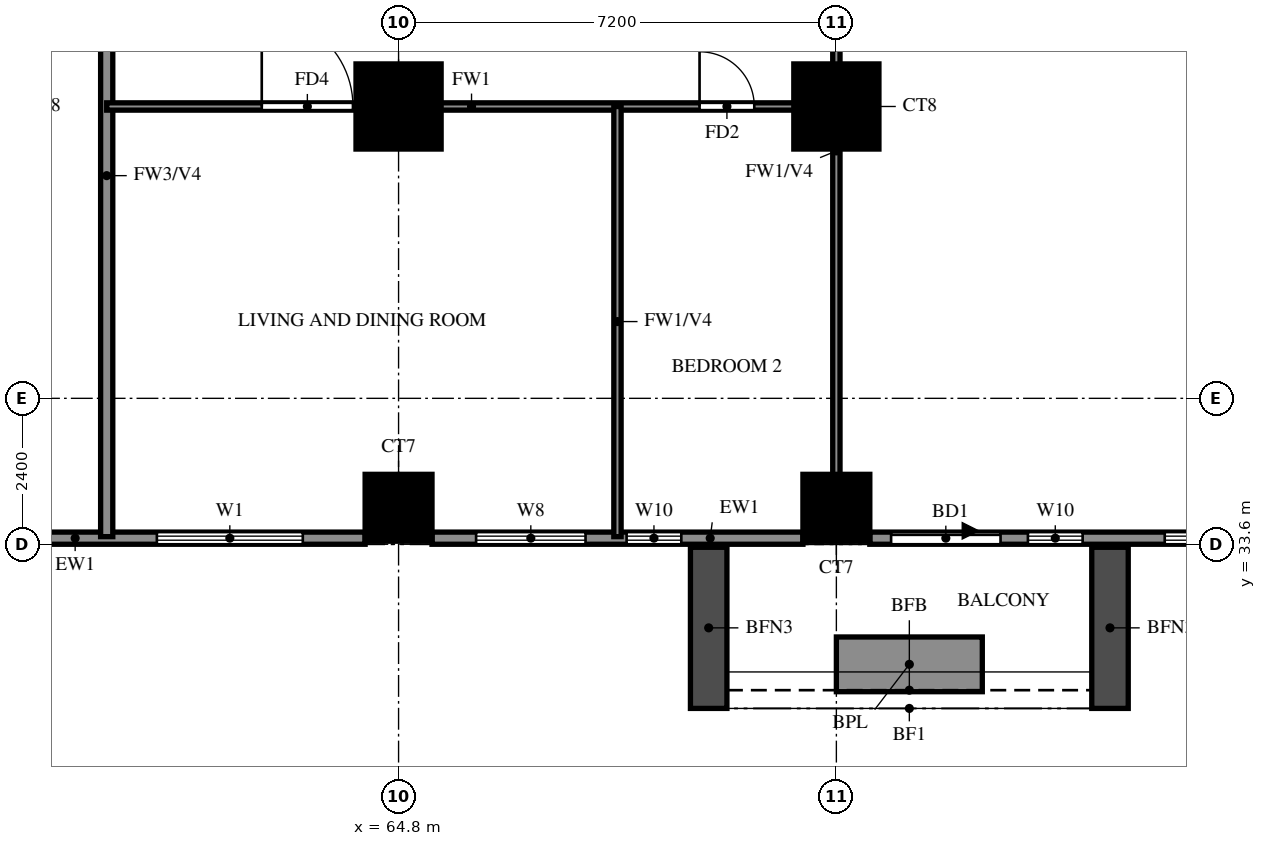
"""IFC4 building model, lengths in metres.
Left out: names, types, materials, properties, quantities, classifications, styles, units other than length and angle.
Written with IfcOpenShell. Run it as: python <this file> out.ifc"""

import sys

from ifc_helpers import new_model, si_unit, direction, frame, frame_2d, origin, origin_2d, place, context, subcontext, project, spatial, rectangle, extrude, source, transform, mapped, element, fill, save


model = new_model("IFC4")
c1 = context("Model", 3, precision=1e-05, world=origin(), true_north=direction((0.0, 1.0)))
c2 = subcontext(c1, "Body", "Model", "MODEL_VIEW")
j1 = project(units=[si_unit("LENGTHUNIT", "METRE"), si_unit("PLANEANGLEUNIT", "RADIAN")], contexts=[c1])
p1 = place(None, origin())
s1 = spatial("IfcSite", under=j1, at=p1, CompositionType="ELEMENT")
p2 = place(p1, origin())
s2 = spatial("IfcBuilding", under=s1, at=p2, CompositionType="ELEMENT")
p3 = place(p2, frame((0.0, 0.0, 30.5)))
s3 = spatial("IfcBuildingStorey", under=s2, at=p3, CompositionType="ELEMENT", Elevation=30.5)
m1 = source(origin(), c2, "Body", "SweptSolid", [
    extrude(rectangle(XDim=1.1, YDim=1.1, at=origin_2d()), origin(), (0.0, 0.0, 1.0), 3.18),
])
for number, where, z_axis, x_axis in (
    (1, (64.8, 34.2, 0.0), (0.0, 0.0, 1.0), (1.0, 0.0, 0.0)),
    (2, (72.0, 34.2, 0.0), (0.0, 0.0, 1.0), (1.0, 0.0, 0.0)),
):
    element("IfcColumn", number, at=place(p3, frame(where, z_axis=z_axis, x_axis=x_axis)), inside=s3, PredefinedType="COLUMN", context=c2, shape_type="MappedRepresentation", body=[
        mapped(m1, transform((0.0, 0.0, 0.0))),
    ])
m2 = source(origin(), c2, "Body", "SweptSolid", [
    extrude(rectangle(XDim=1.4, YDim=1.4, at=origin_2d()), origin(), (0.0, 0.0, 1.0), 3.18),
])
for number, where, z_axis, x_axis in (
    (3, (64.8, 40.8, 0.0), (0.0, 0.0, 1.0), (1.0, 0.0, 0.0)),
    (4, (72.0, 40.8, 0.0), (0.0, 0.0, 1.0), (1.0, 0.0, 0.0)),
):
    element("IfcColumn", number, at=place(p3, frame(where, z_axis=z_axis, x_axis=x_axis)), inside=s3, PredefinedType="COLUMN", context=c2, shape_type="MappedRepresentation", body=[
        mapped(m2, transform((0.0, 0.0, 0.0))),
    ])
p4 = place(p3, frame((78.74, 41.118, 0.0), z_axis=(0.0, 0.0, 1.0), x_axis=(-0.707106781187, 0.707106781187, 0.0)))
e5 = element("IfcWall", 5, at=p4, inside=s3, PredefinedType="SOLIDWALL", context=c2, shape_type="SweptSolid", body=[
    extrude(rectangle(XDim=9.874, YDim=0.2, at=frame_2d((4.937, 0.0))), origin(), (0.0, 0.0, 1.0), 3.18),
])
p5 = place(p3, frame((58.8, 33.7, 0.0), z_axis=(0.0, 0.0, 1.0), x_axis=(1.0, 0.0, 0.0)))
e6 = element("IfcWall", 6, at=p5, inside=s3, PredefinedType="SOLIDWALL", context=c2, shape_type="SweptSolid", body=[
    extrude(rectangle(XDim=5.45, YDim=0.2, at=frame_2d((2.725, 0.0))), origin(), (0.0, 0.0, 1.0), 3.18),
])
p6 = place(p5, frame((2.025, 0.0, 0.6)))
e7 = element("IfcOpeningElement", 7, at=p6, cuts=e6, PredefinedType="OPENING", context=c2, shape_type="SweptSolid", body=[
    extrude(rectangle(XDim=2.4, YDim=2.4, at=frame_2d((1.2, 1.2))), frame((0.0, 0.11, 0.0), z_axis=(0.0, -1.0, 0.0), x_axis=(1.0, 0.0, 0.0)), (0.0, 0.0, 1.0), 0.22),
])
p7 = place(p3, frame((65.35, 33.7, 0.0), z_axis=(0.0, 0.0, 1.0), x_axis=(1.0, 0.0, 0.0)))
e8 = element("IfcWall", 8, at=p7, inside=s3, PredefinedType="SOLIDWALL", context=c2, shape_type="SweptSolid", body=[
    extrude(rectangle(XDim=6.1, YDim=0.2, at=frame_2d((3.05, 0.0))), origin(), (0.0, 0.0, 1.0), 3.18),
])
p8 = place(p7, frame((3.2, 0.0, 0.6)))
e9 = element("IfcOpeningElement", 9, at=p8, cuts=e8, PredefinedType="OPENING", context=c2, shape_type="SweptSolid", body=[
    extrude(rectangle(XDim=0.9, YDim=2.4, at=frame_2d((0.45, 1.2))), frame((0.0, 0.11, 0.0), z_axis=(0.0, -1.0, 0.0), x_axis=(1.0, 0.0, 0.0)), (0.0, 0.0, 1.0), 0.22),
])
p9 = place(p7, frame((0.725, 0.0, 0.6)))
e10 = element("IfcOpeningElement", 10, at=p9, cuts=e8, PredefinedType="OPENING", context=c2, shape_type="SweptSolid", body=[
    extrude(rectangle(XDim=1.8, YDim=2.4, at=frame_2d((0.9, 1.2))), frame((0.0, 0.11, 0.0), z_axis=(0.0, -1.0, 0.0), x_axis=(1.0, 0.0, 0.0)), (0.0, 0.0, 1.0), 0.22),
])
p10 = place(p3, frame((72.55, 33.7, 0.0), z_axis=(0.0, 0.0, 1.0), x_axis=(1.0, 0.0, 0.0)))
e11 = element("IfcWall", 11, at=p10, inside=s3, PredefinedType="SOLIDWALL", context=c2, shape_type="SweptSolid", body=[
    extrude(rectangle(XDim=13.609, YDim=0.2, at=frame_2d((6.804, 0.0))), origin(), (0.0, 0.0, 1.0), 3.18),
])
p11 = place(p10, frame((0.35, 0.0, 0.0)))
e12 = element("IfcOpeningElement", 12, at=p11, cuts=e11, PredefinedType="OPENING", context=c2, shape_type="SweptSolid", body=[
    extrude(rectangle(XDim=1.8, YDim=2.4, at=frame_2d((0.9, 1.2))), frame((0.0, 0.11, 0.0), z_axis=(0.0, -1.0, 0.0), x_axis=(1.0, 0.0, 0.0)), (0.0, 0.0, 1.0), 0.22),
])
p12 = place(p10, frame((2.6, 0.0, 0.6)))
e13 = element("IfcOpeningElement", 13, at=p12, cuts=e11, PredefinedType="OPENING", context=c2, shape_type="SweptSolid", body=[
    extrude(rectangle(XDim=0.9, YDim=2.4, at=frame_2d((0.45, 1.2))), frame((0.0, 0.11, 0.0), z_axis=(0.0, -1.0, 0.0), x_axis=(1.0, 0.0, 0.0)), (0.0, 0.0, 1.0), 0.22),
])
p13 = place(p10, frame((4.85, 0.0, 0.6)))
e14 = element("IfcOpeningElement", 14, at=p13, cuts=e11, PredefinedType="OPENING", context=c2, shape_type="SweptSolid", body=[
    extrude(rectangle(XDim=2.4, YDim=2.4, at=frame_2d((1.2, 1.2))), frame((0.0, 0.11, 0.0), z_axis=(0.0, -1.0, 0.0), x_axis=(1.0, 0.0, 0.0)), (0.0, 0.0, 1.0), 0.22),
])
p14 = place(p10, frame((9.429, 0.0, 0.6)))
e15 = element("IfcOpeningElement", 15, at=p14, cuts=e11, PredefinedType="OPENING", context=c2, shape_type="SweptSolid", body=[
    extrude(rectangle(XDim=2.4, YDim=2.4, at=frame_2d((1.2, 1.2))), frame((0.0, 0.11, 0.0), z_axis=(0.0, -1.0, 0.0), x_axis=(1.0, 0.0, 0.0)), (0.0, 0.0, 1.0), 0.22),
])
for number, where, z_axis, x_axis in (
    (16, (69.9, 33.55, 0.0), (0.0, 0.0, 1.0), (0.0, -1.0, 0.0)),
    (17, (76.5, 33.55, 0.0), (0.0, 0.0, 1.0), (0.0, -1.0, 0.0)),
):
    element("IfcWall", number, at=place(p3, frame(where, z_axis=z_axis, x_axis=x_axis)), inside=s3, PredefinedType="SOLIDWALL", context=c2, shape_type="SweptSolid", body=[
        extrude(rectangle(XDim=2.65, YDim=0.6, at=frame_2d((1.325, 0.0))), origin(), (0.0, 0.0, 1.0), 2.85),
    ])
p15 = place(p3, frame((72.0, 31.625, 0.0), z_axis=(0.0, 0.0, 1.0), x_axis=(1.0, 0.0, 0.0)))
e18 = element("IfcWall", 18, at=p15, inside=s3, PredefinedType="SOLIDWALL", context=c2, shape_type="SweptSolid", body=[
    extrude(rectangle(XDim=2.4, YDim=0.9, at=frame_2d((1.2, 0.0))), origin(), (0.0, 0.0, 1.0), 0.9),
])
p16 = place(p3, frame((60.0, 33.725, 0.0), z_axis=(0.0, 0.0, 1.0), x_axis=(0.0, 1.0, 0.0)))
e19 = element("IfcWall", 19, at=p16, inside=s3, PredefinedType="SOLIDWALL", context=c2, shape_type="SweptSolid", body=[
    extrude(rectangle(XDim=11.875, YDim=0.2, at=frame_2d((5.938, 0.0))), origin(), (0.0, 0.0, 1.0), 2.28),
])
p17 = place(p3, frame((60.0, 40.8, 0.0), z_axis=(0.0, 0.0, 1.0), x_axis=(1.0, 0.0, 0.0)))
e20 = element("IfcWall", 20, at=p17, inside=s3, PredefinedType="PARTITIONING", context=c2, shape_type="SweptSolid", body=[
    extrude(rectangle(XDim=12.0, YDim=0.12, at=frame_2d((6.0, 0.0))), origin(), (0.0, 0.0, 1.0), 3.18),
])
p18 = place(p17, frame((9.75, 0.0, 0.0)))
e21 = element("IfcOpeningElement", 21, at=p18, cuts=e20, PredefinedType="OPENING", context=c2, shape_type="SweptSolid", body=[
    extrude(rectangle(XDim=0.9, YDim=2.1, at=frame_2d((0.45, 1.05))), frame((0.0, 0.07, 0.0), z_axis=(0.0, -1.0, 0.0), x_axis=(1.0, 0.0, 0.0)), (0.0, 0.0, 1.0), 0.14),
])
p19 = place(p17, frame((2.55, 0.0, 0.0)))
e22 = element("IfcOpeningElement", 22, at=p19, cuts=e20, PredefinedType="OPENING", context=c2, shape_type="SweptSolid", body=[
    extrude(rectangle(XDim=1.5, YDim=2.1, at=frame_2d((0.75, 1.05))), frame((0.0, 0.07, 0.0), z_axis=(0.0, -1.0, 0.0), x_axis=(1.0, 0.0, 0.0)), (0.0, 0.0, 1.0), 0.14),
])
p20 = place(p3, frame((68.4, 33.725, 0.0), z_axis=(0.0, 0.0, 1.0), x_axis=(0.0, 1.0, 0.0)))
e23 = element("IfcWall", 23, at=p20, inside=s3, PredefinedType="PARTITIONING", context=c2, shape_type="SweptSolid", body=[
    extrude(rectangle(XDim=7.075, YDim=0.12, at=frame_2d((3.538, 0.0))), origin(), (0.0, 0.0, 1.0), 2.28),
])
p21 = place(p3, frame((72.0, 33.725, 0.0), z_axis=(0.0, 0.0, 1.0), x_axis=(0.0, 1.0, 0.0)))
e24 = element("IfcWall", 24, at=p21, inside=s3, PredefinedType="PARTITIONING", context=c2, shape_type="SweptSolid", body=[
    extrude(rectangle(XDim=14.098, YDim=0.12, at=frame_2d((7.049, 0.0))), origin(), (0.0, 0.0, 1.0), 2.28),
])
p22 = place(p21, frame((10.075, 0.0, 0.0)))
e25 = element("IfcOpeningElement", 25, at=p22, cuts=e24, PredefinedType="OPENING", context=c2, shape_type="SweptSolid", body=[
    extrude(rectangle(XDim=0.9, YDim=2.1, at=frame_2d((0.45, 1.05))), frame((0.0, 0.07, 0.0), z_axis=(0.0, -1.0, 0.0), x_axis=(1.0, 0.0, 0.0)), (0.0, 0.0, 1.0), 0.14),
])
p23 = place(p6, origin())
e26 = element("IfcWindow", 26, at=p23, inside=s3, PartitioningType="DOUBLE_PANEL_VERTICAL", PredefinedType="WINDOW", context=c2, shape_type="SweptSolid", body=[
    extrude(rectangle(XDim=2.4, YDim=2.4, at=frame_2d((1.2, 1.2))), frame((0.0, 0.03, 0.0), z_axis=(0.0, -1.0, 0.0), x_axis=(1.0, 0.0, 0.0)), (0.0, 0.0, 1.0), 0.06),
])
fill(e7, e26)
p24 = place(p8, origin())
e27 = element("IfcWindow", 27, at=p24, inside=s3, PartitioningType="SINGLE_PANEL", PredefinedType="WINDOW", context=c2, shape_type="SweptSolid", body=[
    extrude(rectangle(XDim=0.9, YDim=2.4, at=frame_2d((0.45, 1.2))), frame((0.0, 0.03, 0.0), z_axis=(0.0, -1.0, 0.0), x_axis=(1.0, 0.0, 0.0)), (0.0, 0.0, 1.0), 0.06),
])
fill(e9, e27)
p25 = place(p9, origin())
e28 = element("IfcWindow", 28, at=p25, inside=s3, PartitioningType="DOUBLE_PANEL_VERTICAL", PredefinedType="WINDOW", context=c2, shape_type="SweptSolid", body=[
    extrude(rectangle(XDim=1.8, YDim=2.4, at=frame_2d((0.9, 1.2))), frame((0.0, 0.03, 0.0), z_axis=(0.0, -1.0, 0.0), x_axis=(1.0, 0.0, 0.0)), (0.0, 0.0, 1.0), 0.06),
])
fill(e10, e28)
p26 = place(p11, origin())
e29 = element("IfcDoor", 29, at=p26, inside=s3, OperationType="DOUBLE_DOOR_SLIDING", PredefinedType="DOOR", context=c2, shape_type="SweptSolid", body=[
    extrude(rectangle(XDim=1.8, YDim=2.4, at=frame_2d((0.9, 1.2))), frame((0.0, 0.025, 0.0), z_axis=(0.0, -1.0, 0.0), x_axis=(1.0, 0.0, 0.0)), (0.0, 0.0, 1.0), 0.05),
])
fill(e12, e29)
p27 = place(p12, origin())
e30 = element("IfcWindow", 30, at=p27, inside=s3, PartitioningType="SINGLE_PANEL", PredefinedType="WINDOW", context=c2, shape_type="SweptSolid", body=[
    extrude(rectangle(XDim=0.9, YDim=2.4, at=frame_2d((0.45, 1.2))), frame((0.0, 0.03, 0.0), z_axis=(0.0, -1.0, 0.0), x_axis=(1.0, 0.0, 0.0)), (0.0, 0.0, 1.0), 0.06),
])
fill(e13, e30)
p28 = place(p13, origin())
e31 = element("IfcWindow", 31, at=p28, inside=s3, PartitioningType="DOUBLE_PANEL_VERTICAL", PredefinedType="WINDOW", context=c2, shape_type="SweptSolid", body=[
    extrude(rectangle(XDim=2.4, YDim=2.4, at=frame_2d((1.2, 1.2))), frame((0.0, 0.03, 0.0), z_axis=(0.0, -1.0, 0.0), x_axis=(1.0, 0.0, 0.0)), (0.0, 0.0, 1.0), 0.06),
])
fill(e14, e31)
p29 = place(p18, origin())
e32 = element("IfcDoor", 32, at=p29, inside=s3, OperationType="SINGLE_SWING_RIGHT", PredefinedType="DOOR", context=c2, shape_type="SweptSolid", body=[
    extrude(rectangle(XDim=0.9, YDim=2.1, at=frame_2d((0.45, 1.05))), frame((0.0, 0.025, 0.0), z_axis=(0.0, -1.0, 0.0), x_axis=(1.0, 0.0, 0.0)), (0.0, 0.0, 1.0), 0.05),
])
fill(e21, e32)
p30 = place(p19, origin())
e33 = element("IfcDoor", 33, at=p30, inside=s3, OperationType="SINGLE_SWING_RIGHT", PredefinedType="DOOR", context=c2, shape_type="SweptSolid", body=[
    extrude(rectangle(XDim=1.5, YDim=2.1, at=frame_2d((0.75, 1.05))), frame((0.0, 0.025, 0.0), z_axis=(0.0, -1.0, 0.0), x_axis=(1.0, 0.0, 0.0)), (0.0, 0.0, 1.0), 0.05),
])
fill(e22, e33)
save(model, sys.argv[1])
